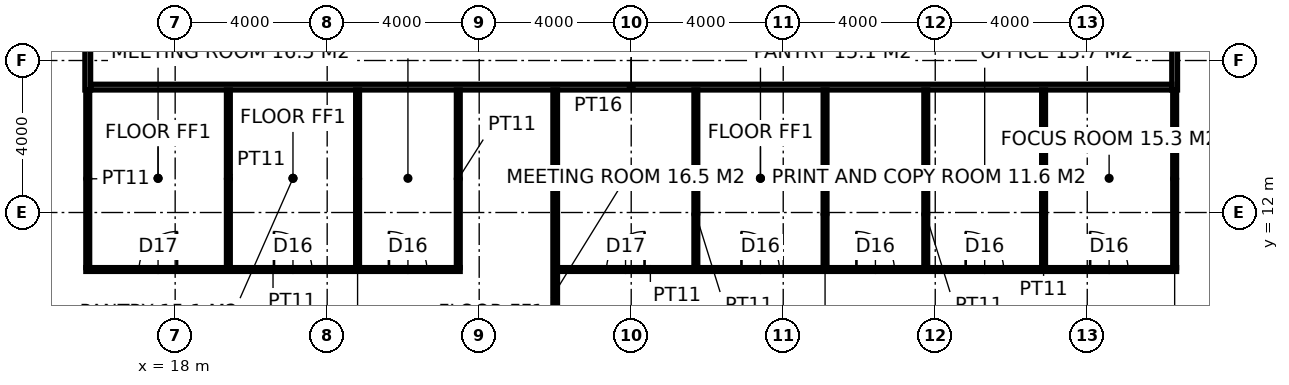
"""IFC4 building model, lengths in metres.
Left out: names, types, materials, properties, quantities, classifications, styles, units other than length and angle.
Written with IfcOpenShell. Run it as: python <this file> out.ifc"""

import sys

from ifc_helpers import new_model, si_unit, direction, frame, frame_2d, origin, place, context, subcontext, project, spatial, rectangle, extrude, element, fill, save


model = new_model("IFC4")
c1 = context("Model", 3, precision=1e-05, world=origin(), true_north=direction((0.0, 1.0)))
c2 = subcontext(c1, "Body", "Model", "MODEL_VIEW")
j1 = project(units=[si_unit("LENGTHUNIT", "METRE"), si_unit("PLANEANGLEUNIT", "RADIAN")], contexts=[c1])
p1 = place(None, origin())
s1 = spatial("IfcSite", under=j1, at=p1, CompositionType="ELEMENT")
p2 = place(p1, origin())
s2 = spatial("IfcBuilding", under=s1, at=p2, CompositionType="ELEMENT")
p3 = place(p2, frame((0.0, 0.0, 15.0)))
s3 = spatial("IfcBuildingStorey", under=s2, at=p3, CompositionType="ELEMENT", Elevation=15.0)
p4 = place(p3, frame((15.7, 15.225, 0.0), z_axis=(0.0, 0.0, 1.0), x_axis=(0.0, 1.0, 0.0)))
e1 = element("IfcWall", 1, at=p4, inside=s3, PredefinedType="PARTITIONING", context=c2, shape_type="SweptSolid", body=[
    extrude(rectangle(XDim=23.55, YDim=0.15, at=frame_2d((11.775, 0.0))), origin(), (0.0, 0.0, 1.0), 3.85),
])
p5 = place(p4, frame((5.175, 0.0, 0.0)))
e2 = element("IfcOpeningElement", 2, at=p5, cuts=e1, PredefinedType="OPENING", context=c2, shape_type="SweptSolid", body=[
    extrude(rectangle(XDim=1.8, YDim=2.4, at=frame_2d((0.9, 1.2))), frame((0.0, 0.085, 0.0), z_axis=(0.0, -1.0, 0.0), x_axis=(1.0, 0.0, 0.0)), (0.0, 0.0, 1.0), 0.17),
])
p6 = place(p4, frame((16.825, 0.0, 0.0)))
e3 = element("IfcOpeningElement", 3, at=p6, cuts=e1, PredefinedType="OPENING", context=c2, shape_type="SweptSolid", body=[
    extrude(rectangle(XDim=1.8, YDim=2.4, at=frame_2d((0.9, 1.2))), frame((0.0, 0.085, 0.0), z_axis=(0.0, -1.0, 0.0), x_axis=(1.0, 0.0, 0.0)), (0.0, 0.0, 1.0), 0.17),
])
p7 = place(p3, frame((44.3, 15.225, 0.0), z_axis=(0.0, 0.0, 1.0), x_axis=(0.0, 1.0, 0.0)))
e4 = element("IfcWall", 4, at=p7, inside=s3, PredefinedType="PARTITIONING", context=c2, shape_type="SweptSolid", body=[
    extrude(rectangle(XDim=23.55, YDim=0.15, at=frame_2d((11.775, 0.0))), origin(), (0.0, 0.0, 1.0), 3.85),
])
p8 = place(p7, frame((5.575, 0.0, 0.0)))
e5 = element("IfcOpeningElement", 5, at=p8, cuts=e4, PredefinedType="OPENING", context=c2, shape_type="SweptSolid", body=[
    extrude(rectangle(XDim=1.8, YDim=2.4, at=frame_2d((0.9, 1.2))), frame((0.0, 0.085, 0.0), z_axis=(0.0, -1.0, 0.0), x_axis=(1.0, 0.0, 0.0)), (0.0, 0.0, 1.0), 0.17),
])
p9 = place(p7, frame((16.825, 0.0, 0.0)))
e6 = element("IfcOpeningElement", 6, at=p9, cuts=e4, PredefinedType="OPENING", context=c2, shape_type="SweptSolid", body=[
    extrude(rectangle(XDim=1.8, YDim=2.4, at=frame_2d((0.9, 1.2))), frame((0.0, 0.085, 0.0), z_axis=(0.0, -1.0, 0.0), x_axis=(1.0, 0.0, 0.0)), (0.0, 0.0, 1.0), 0.17),
])
p10 = place(p3, frame((15.775, 15.3, 0.0), z_axis=(0.0, 0.0, 1.0), x_axis=(1.0, 0.0, 0.0)))
e7 = element("IfcWall", 7, at=p10, inside=s3, PredefinedType="PARTITIONING", context=c2, shape_type="SweptSolid", body=[
    extrude(rectangle(XDim=28.45, YDim=0.15, at=frame_2d((14.225, 0.0))), origin(), (0.0, 0.0, 1.0), 3.85),
])
p11 = place(p3, frame((28.0, -3.7, 0.0), z_axis=(0.0, 0.0, 1.0), x_axis=(0.0, 1.0, 0.0)))
e8 = element("IfcWall", 8, at=p11, inside=s3, PredefinedType="PARTITIONING", context=c2, shape_type="SweptSolid", body=[
    extrude(rectangle(XDim=18.925, YDim=0.12, at=frame_2d((9.462, 0.0))), origin(), (0.0, 0.0, 1.0), 3.85),
])
p12 = place(p3, frame((15.65, 10.5, 0.0), z_axis=(0.0, 0.0, 1.0), x_axis=(1.0, 0.0, 0.0)))
e9 = element("IfcWall", 9, at=p12, inside=s3, PredefinedType="PARTITIONING", context=c2, shape_type="SweptSolid", body=[
    extrude(rectangle(XDim=9.85, YDim=0.1, at=frame_2d((4.925, 0.0))), origin(), (0.0, 0.0, 1.0), 3.85),
])
p13 = place(p12, frame((1.4, 0.0, 0.0)))
e10 = element("IfcOpeningElement", 10, at=p13, cuts=e9, PredefinedType="OPENING", context=c2, shape_type="SweptSolid", body=[
    extrude(rectangle(XDim=1.0, YDim=2.2, at=frame_2d((0.5, 1.1))), frame((0.0, 0.06, 0.0), z_axis=(0.0, -1.0, 0.0), x_axis=(1.0, 0.0, 0.0)), (0.0, 0.0, 1.0), 0.12),
])
p14 = place(p12, frame((4.95, 0.0, 0.0)))
e11 = element("IfcOpeningElement", 11, at=p14, cuts=e9, PredefinedType="OPENING", context=c2, shape_type="SweptSolid", body=[
    extrude(rectangle(XDim=1.0, YDim=2.2, at=frame_2d((0.5, 1.1))), frame((0.0, 0.06, 0.0), z_axis=(0.0, -1.0, 0.0), x_axis=(1.0, 0.0, 0.0)), (0.0, 0.0, 1.0), 0.12),
])
p15 = place(p12, frame((7.975, 0.0, 0.0)))
e12 = element("IfcOpeningElement", 12, at=p15, cuts=e9, PredefinedType="OPENING", context=c2, shape_type="SweptSolid", body=[
    extrude(rectangle(XDim=1.0, YDim=2.2, at=frame_2d((0.5, 1.1))), frame((0.0, 0.06, 0.0), z_axis=(0.0, -1.0, 0.0), x_axis=(1.0, 0.0, 0.0)), (0.0, 0.0, 1.0), 0.12),
])
p16 = place(p3, frame((28.061, 10.5, 0.0), z_axis=(0.0, 0.0, 1.0), x_axis=(1.0, 0.0, 0.0)))
e13 = element("IfcWall", 13, at=p16, inside=s3, PredefinedType="PARTITIONING", context=c2, shape_type="SweptSolid", body=[
    extrude(rectangle(XDim=16.289, YDim=0.1, at=frame_2d((8.145, 0.0))), origin(), (0.0, 0.0, 1.0), 3.85),
])
p17 = place(p16, frame((1.29, 0.0, 0.0)))
e14 = element("IfcOpeningElement", 14, at=p17, cuts=e13, PredefinedType="OPENING", context=c2, shape_type="SweptSolid", body=[
    extrude(rectangle(XDim=1.0, YDim=2.2, at=frame_2d((0.5, 1.1))), frame((0.0, 0.06, 0.0), z_axis=(0.0, -1.0, 0.0), x_axis=(1.0, 0.0, 0.0)), (0.0, 0.0, 1.0), 0.12),
])
p18 = place(p16, frame((4.84, 0.0, 0.0)))
e15 = element("IfcOpeningElement", 15, at=p18, cuts=e13, PredefinedType="OPENING", context=c2, shape_type="SweptSolid", body=[
    extrude(rectangle(XDim=1.0, YDim=2.2, at=frame_2d((0.5, 1.1))), frame((0.0, 0.06, 0.0), z_axis=(0.0, -1.0, 0.0), x_axis=(1.0, 0.0, 0.0)), (0.0, 0.0, 1.0), 0.12),
])
p19 = place(p16, frame((7.865, 0.0, 0.0)))
e16 = element("IfcOpeningElement", 16, at=p19, cuts=e13, PredefinedType="OPENING", context=c2, shape_type="SweptSolid", body=[
    extrude(rectangle(XDim=1.0, YDim=2.2, at=frame_2d((0.5, 1.1))), frame((0.0, 0.06, 0.0), z_axis=(0.0, -1.0, 0.0), x_axis=(1.0, 0.0, 0.0)), (0.0, 0.0, 1.0), 0.12),
])
p20 = place(p16, frame((10.74, 0.0, 0.0)))
e17 = element("IfcOpeningElement", 17, at=p20, cuts=e13, PredefinedType="OPENING", context=c2, shape_type="SweptSolid", body=[
    extrude(rectangle(XDim=1.0, YDim=2.2, at=frame_2d((0.5, 1.1))), frame((0.0, 0.06, 0.0), z_axis=(0.0, -1.0, 0.0), x_axis=(1.0, 0.0, 0.0)), (0.0, 0.0, 1.0), 0.12),
])
p21 = place(p16, frame((14.014, 0.0, 0.0)))
e18 = element("IfcOpeningElement", 18, at=p21, cuts=e13, PredefinedType="OPENING", context=c2, shape_type="SweptSolid", body=[
    extrude(rectangle(XDim=1.0, YDim=2.2, at=frame_2d((0.5, 1.1))), frame((0.0, 0.06, 0.0), z_axis=(0.0, -1.0, 0.0), x_axis=(1.0, 0.0, 0.0)), (0.0, 0.0, 1.0), 0.12),
])
for number, where, z_axis, x_axis in (
    (19, (15.7, 10.55, 0.0), (0.0, 0.0, 1.0), (0.0, 1.0, 0.0)),
    (20, (19.4, 10.55, 0.0), (0.0, 0.0, 1.0), (0.0, 1.0, 0.0)),
    (21, (22.8, 10.55, 0.0), (0.0, 0.0, 1.0), (0.0, 1.0, 0.0)),
    (22, (25.45, 10.55, 0.0), (0.0, 0.0, 1.0), (0.0, 1.0, 0.0)),
    (23, (31.701, 10.55, 0.0), (0.0, 0.0, 1.0), (0.0, 1.0, 0.0)),
    (24, (35.101, 10.55, 0.0), (0.0, 0.0, 1.0), (0.0, 1.0, 0.0)),
    (25, (37.751, 10.55, 0.0), (0.0, 0.0, 1.0), (0.0, 1.0, 0.0)),
    (26, (40.851, 10.55, 0.0), (0.0, 0.0, 1.0), (0.0, 1.0, 0.0)),
    (27, (44.3, 10.55, 0.0), (0.0, 0.0, 1.0), (0.0, 1.0, 0.0)),
):
    element("IfcWall", number, at=place(p3, frame(where, z_axis=z_axis, x_axis=x_axis)), inside=s3, PredefinedType="PARTITIONING", context=c2, shape_type="SweptSolid", body=[
        extrude(rectangle(XDim=4.675, YDim=0.1, at=frame_2d((2.337, 0.0))), origin(), (0.0, 0.0, 1.0), 3.85),
    ])
p22 = place(p13, origin())
e28 = element("IfcDoor", 28, at=p22, inside=s3, OperationType="SINGLE_SWING_RIGHT", PredefinedType="DOOR", context=c2, shape_type="SweptSolid", body=[
    extrude(rectangle(XDim=1.0, YDim=2.2, at=frame_2d((0.5, 1.1))), frame((0.0, 0.025, 0.0), z_axis=(0.0, -1.0, 0.0), x_axis=(1.0, 0.0, 0.0)), (0.0, 0.0, 1.0), 0.05),
])
fill(e10, e28)
p23 = place(p14, origin())
e29 = element("IfcDoor", 29, at=p23, inside=s3, OperationType="SINGLE_SWING_LEFT", PredefinedType="DOOR", context=c2, shape_type="SweptSolid", body=[
    extrude(rectangle(XDim=1.0, YDim=2.2, at=frame_2d((0.5, 1.1))), frame((0.0, 0.025, 0.0), z_axis=(0.0, -1.0, 0.0), x_axis=(1.0, 0.0, 0.0)), (0.0, 0.0, 1.0), 0.05),
])
fill(e11, e29)
p24 = place(p15, origin())
e30 = element("IfcDoor", 30, at=p24, inside=s3, OperationType="SINGLE_SWING_LEFT", PredefinedType="DOOR", context=c2, shape_type="SweptSolid", body=[
    extrude(rectangle(XDim=1.0, YDim=2.2, at=frame_2d((0.5, 1.1))), frame((0.0, 0.025, 0.0), z_axis=(0.0, -1.0, 0.0), x_axis=(1.0, 0.0, 0.0)), (0.0, 0.0, 1.0), 0.05),
])
fill(e12, e30)
p25 = place(p17, origin())
e31 = element("IfcDoor", 31, at=p25, inside=s3, OperationType="SINGLE_SWING_RIGHT", PredefinedType="DOOR", context=c2, shape_type="SweptSolid", body=[
    extrude(rectangle(XDim=1.0, YDim=2.2, at=frame_2d((0.5, 1.1))), frame((0.0, 0.025, 0.0), z_axis=(0.0, -1.0, 0.0), x_axis=(1.0, 0.0, 0.0)), (0.0, 0.0, 1.0), 0.05),
])
fill(e14, e31)
p26 = place(p18, origin())
e32 = element("IfcDoor", 32, at=p26, inside=s3, OperationType="SINGLE_SWING_LEFT", PredefinedType="DOOR", context=c2, shape_type="SweptSolid", body=[
    extrude(rectangle(XDim=1.0, YDim=2.2, at=frame_2d((0.5, 1.1))), frame((0.0, 0.025, 0.0), z_axis=(0.0, -1.0, 0.0), x_axis=(1.0, 0.0, 0.0)), (0.0, 0.0, 1.0), 0.05),
])
fill(e15, e32)
p27 = place(p19, origin())
e33 = element("IfcDoor", 33, at=p27, inside=s3, OperationType="SINGLE_SWING_LEFT", PredefinedType="DOOR", context=c2, shape_type="SweptSolid", body=[
    extrude(rectangle(XDim=1.0, YDim=2.2, at=frame_2d((0.5, 1.1))), frame((0.0, 0.025, 0.0), z_axis=(0.0, -1.0, 0.0), x_axis=(1.0, 0.0, 0.0)), (0.0, 0.0, 1.0), 0.05),
])
fill(e16, e33)
p28 = place(p20, origin())
e34 = element("IfcDoor", 34, at=p28, inside=s3, OperationType="SINGLE_SWING_LEFT", PredefinedType="DOOR", context=c2, shape_type="SweptSolid", body=[
    extrude(rectangle(XDim=1.0, YDim=2.2, at=frame_2d((0.5, 1.1))), frame((0.0, 0.025, 0.0), z_axis=(0.0, -1.0, 0.0), x_axis=(1.0, 0.0, 0.0)), (0.0, 0.0, 1.0), 0.05),
])
fill(e17, e34)
p29 = place(p21, origin())
e35 = element("IfcDoor", 35, at=p29, inside=s3, OperationType="SINGLE_SWING_LEFT", PredefinedType="DOOR", context=c2, shape_type="SweptSolid", body=[
    extrude(rectangle(XDim=1.0, YDim=2.2, at=frame_2d((0.5, 1.1))), frame((0.0, 0.025, 0.0), z_axis=(0.0, -1.0, 0.0), x_axis=(1.0, 0.0, 0.0)), (0.0, 0.0, 1.0), 0.05),
])
fill(e18, e35)
save(model, sys.argv[1])
